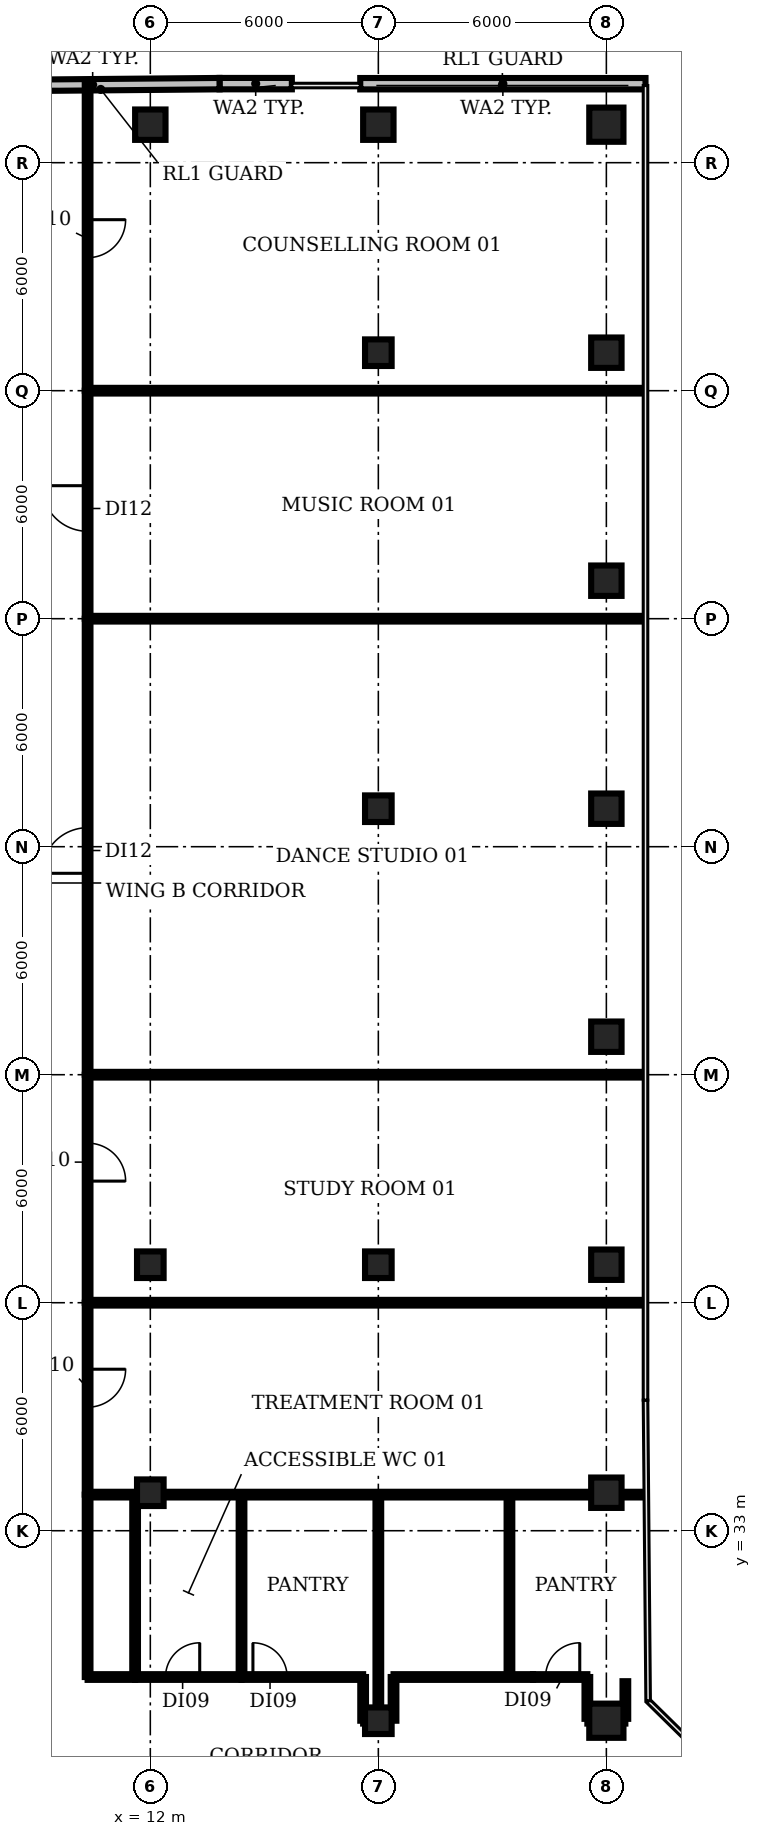
"""IFC4 building model, lengths in metres.
Left out: names, types, materials, properties, quantities, classifications, styles, units other than length and angle.
Written with IfcOpenShell. Run it as: python <this file> out.ifc"""

import sys

from ifc_helpers import new_model, si_unit, direction, frame, frame_2d, origin, origin_2d, place, context, subcontext, project, spatial, rectangle, circle, extrude, element, fill, save


model = new_model("IFC4")
c1 = context("Model", 3, precision=1e-05, world=origin(), true_north=direction((0.0, 1.0)))
c2 = subcontext(c1, "Body", "Model", "MODEL_VIEW")
j1 = project(units=[si_unit("LENGTHUNIT", "METRE"), si_unit("PLANEANGLEUNIT", "RADIAN")], contexts=[c1])
p1 = place(None, origin())
s1 = spatial("IfcSite", under=j1, at=p1, CompositionType="ELEMENT")
p2 = place(p1, origin())
s2 = spatial("IfcBuilding", under=s1, at=p2, CompositionType="ELEMENT")
p3 = place(p2, frame((0.0, 0.0, 226.4)))
s3 = spatial("IfcBuildingStorey", under=s2, at=p3, CompositionType="ELEMENT", Elevation=226.4)
for number, where, z_axis, x_axis in (
    (1, (12.0, 34.0, 0.0), (0.0, 0.0, 1.0), (1.0, 0.0, 0.0)),
    (2, (12.0, 40.0, 0.0), (0.0, 0.0, 1.0), (1.0, 0.0, 0.0)),
):
    element("IfcColumn", number, at=place(p3, frame(where, z_axis=z_axis, x_axis=x_axis)), inside=s3, PredefinedType="COLUMN", context=c2, shape_type="SweptSolid", body=[
        extrude(rectangle(XDim=0.7, YDim=0.7, at=origin_2d()), origin(), (0.0, 0.0, 1.0), 3.85),
    ])
p4 = place(p3, frame((12.0, 70.0, 0.0), z_axis=(0.0, 0.0, 1.0), x_axis=(1.0, 0.0, 0.0)))
e3 = element("IfcColumn", 3, at=p4, inside=s3, PredefinedType="COLUMN", context=c2, shape_type="SweptSolid", body=[
    extrude(rectangle(XDim=0.8, YDim=0.8, at=origin_2d()), origin(), (0.0, 0.0, 1.0), 3.85),
])
for number, where, z_axis, x_axis in (
    (4, (18.0, 28.0, 0.0), (0.0, 0.0, 1.0), (1.0, 0.0, 0.0)),
    (5, (18.0, 40.0, 0.0), (0.0, 0.0, 1.0), (1.0, 0.0, 0.0)),
    (6, (18.0, 52.0, 0.0), (0.0, 0.0, 1.0), (1.0, 0.0, 0.0)),
    (7, (18.0, 64.0, 0.0), (0.0, 0.0, 1.0), (1.0, 0.0, 0.0)),
):
    element("IfcColumn", number, at=place(p3, frame(where, z_axis=z_axis, x_axis=x_axis)), inside=s3, PredefinedType="COLUMN", context=c2, shape_type="SweptSolid", body=[
        extrude(rectangle(XDim=0.7, YDim=0.7, at=origin_2d()), origin(), (0.0, 0.0, 1.0), 3.85),
    ])
p5 = place(p3, frame((18.0, 70.0, 0.0), z_axis=(0.0, 0.0, 1.0), x_axis=(1.0, 0.0, 0.0)))
e8 = element("IfcColumn", 8, at=p5, inside=s3, PredefinedType="COLUMN", context=c2, shape_type="SweptSolid", body=[
    extrude(rectangle(XDim=0.8, YDim=0.8, at=origin_2d()), origin(), (0.0, 0.0, 1.0), 3.85),
])
p6 = place(p3, frame((24.0, 28.0, 0.0), z_axis=(0.0, 0.0, 1.0), x_axis=(1.0, 0.0, 0.0)))
e9 = element("IfcColumn", 9, at=p6, inside=s3, PredefinedType="COLUMN", context=c2, shape_type="SweptSolid", body=[
    extrude(circle(Radius=0.45, at=origin_2d()), origin(), (0.0, 0.0, 1.0), 3.85),
])
for number, where, z_axis, x_axis in (
    (10, (24.0, 34.0, 0.0), (0.0, 0.0, 1.0), (1.0, 0.0, 0.0)),
    (11, (24.0, 40.0, 0.0), (0.0, 0.0, 1.0), (1.0, 0.0, 0.0)),
    (12, (24.0, 46.0, 0.0), (0.0, 0.0, 1.0), (1.0, 0.0, 0.0)),
    (13, (24.0, 52.0, 0.0), (0.0, 0.0, 1.0), (1.0, 0.0, 0.0)),
    (14, (24.0, 58.0, 0.0), (0.0, 0.0, 1.0), (1.0, 0.0, 0.0)),
    (15, (24.0, 64.0, 0.0), (0.0, 0.0, 1.0), (1.0, 0.0, 0.0)),
):
    element("IfcColumn", number, at=place(p3, frame(where, z_axis=z_axis, x_axis=x_axis)), inside=s3, PredefinedType="COLUMN", context=c2, shape_type="SweptSolid", body=[
        extrude(rectangle(XDim=0.8, YDim=0.8, at=origin_2d()), origin(), (0.0, 0.0, 1.0), 3.85),
    ])
p7 = place(p3, frame((24.0, 70.0, 0.0), z_axis=(0.0, 0.0, 1.0), x_axis=(1.0, 0.0, 0.0)))
e16 = element("IfcColumn", 16, at=p7, inside=s3, PredefinedType="COLUMN", context=c2, shape_type="SweptSolid", body=[
    extrude(circle(Radius=0.45, at=origin_2d()), origin(), (0.0, 0.0, 1.0), 3.85),
])
p8 = place(p3, frame((25.03, 71.078, 0.0), z_axis=(0.0, 0.0, 1.0), x_axis=(-1.0, 0.0, 0.0)))
e17 = element("IfcWall", 17, at=p8, inside=s3, PredefinedType="SOLIDWALL", context=c2, shape_type="SweptSolid", body=[
    extrude(rectangle(XDim=7.506, YDim=0.3, at=frame_2d((3.753, 0.0))), origin(), (0.0, 0.0, 1.0), 3.85),
])
p9 = place(p3, frame((15.724, 71.08, 0.0), z_axis=(0.0, 0.0, 1.0), x_axis=(-1.0, 0.0, 0.0)))
e18 = element("IfcWall", 18, at=p9, inside=s3, PredefinedType="SOLIDWALL", context=c2, shape_type="SweptSolid", body=[
    extrude(rectangle(XDim=1.902, YDim=0.3, at=frame_2d((0.951, 0.0))), origin(), (0.0, 0.0, 1.0), 3.85),
])
p10 = place(p3, frame((13.821, 71.08, 0.0), z_axis=(0.0, 0.0, 1.0), x_axis=(-0.999961815264, -0.008738879401, 0.0)))
e19 = element("IfcWall", 19, at=p10, inside=s3, PredefinedType="SOLIDWALL", context=c2, shape_type="SweptSolid", body=[
    extrude(rectangle(XDim=6.677, YDim=0.3, at=frame_2d((3.338, 0.0))), origin(), (0.0, 0.0, 1.0), 3.85),
])
p11 = place(p3, frame((10.35, 29.15, 0.0), z_axis=(0.0, 0.0, 1.0), x_axis=(0.0, 1.0, 0.0)))
e20 = element("IfcWall", 20, at=p11, inside=s3, PredefinedType="PARTITIONING", context=c2, shape_type="SweptSolid", body=[
    extrude(rectangle(XDim=4.8, YDim=0.15, at=frame_2d((2.4, 0.0))), origin(), (0.0, 0.0, 1.0), 2.88),
])
p12 = place(p3, frame((10.35, 29.15, 0.0), z_axis=(0.0, 0.0, 1.0), x_axis=(1.0, 0.0, 0.0)))
e21 = element("IfcWall", 21, at=p12, inside=s3, PredefinedType="PARTITIONING", context=c2, shape_type="SweptSolid", body=[
    extrude(rectangle(XDim=1.25, YDim=0.15, at=frame_2d((0.625, 0.0))), origin(), (0.0, 0.0, 1.0), 2.88),
])
p13 = place(p3, frame((10.35, 33.95, 0.0), z_axis=(0.0, 0.0, 1.0), x_axis=(1.0, 0.0, 0.0)))
e22 = element("IfcWall", 22, at=p13, inside=s3, PredefinedType="PARTITIONING", context=c2, shape_type="SweptSolid", body=[
    extrude(rectangle(XDim=1.242, YDim=0.15, at=frame_2d((0.621, 0.0))), origin(), (0.0, 0.0, 1.0), 2.88),
])
p14 = place(p3, frame((10.35, 39.0, 0.0), z_axis=(0.0, 0.0, 1.0), x_axis=(0.0, -1.0, 0.0)))
e23 = element("IfcWall", 23, at=p14, inside=s3, PredefinedType="PARTITIONING", context=c2, shape_type="SweptSolid", body=[
    extrude(rectangle(XDim=5.05, YDim=0.15, at=frame_2d((2.525, 0.0))), origin(), (0.0, 0.0, 1.0), 2.88),
])
p15 = place(p14, frame((1.75, 0.0, 0.0)))
e24 = element("IfcOpeningElement", 24, at=p15, cuts=e23, PredefinedType="OPENING", context=c2, shape_type="SweptSolid", body=[
    extrude(rectangle(XDim=1.0, YDim=2.1, at=frame_2d((0.5, 1.05))), frame((0.0, 0.085, 0.0), z_axis=(0.0, -1.0, 0.0), x_axis=(1.0, 0.0, 0.0)), (0.0, 0.0, 1.0), 0.17),
])
p16 = place(p3, frame((10.35, 39.0, 0.0), z_axis=(0.0, 0.0, 1.0), x_axis=(1.0, 0.0, 0.0)))
e25 = element("IfcWall", 25, at=p16, inside=s3, PredefinedType="PARTITIONING", context=c2, shape_type="SweptSolid", body=[
    extrude(rectangle(XDim=14.63, YDim=0.15, at=frame_2d((7.315, 0.0))), origin(), (0.0, 0.0, 1.0), 2.88),
])
p17 = place(p3, frame((10.35, 45.0, 0.0), z_axis=(0.0, 0.0, 1.0), x_axis=(0.0, -1.0, 0.0)))
e26 = element("IfcWall", 26, at=p17, inside=s3, PredefinedType="PARTITIONING", context=c2, shape_type="SweptSolid", body=[
    extrude(rectangle(XDim=6.0, YDim=0.15, at=frame_2d((3.0, 0.0))), origin(), (0.0, 0.0, 1.0), 2.88),
])
p18 = place(p17, frame((1.8, 0.0, 0.0)))
e27 = element("IfcOpeningElement", 27, at=p18, cuts=e26, PredefinedType="OPENING", context=c2, shape_type="SweptSolid", body=[
    extrude(rectangle(XDim=1.0, YDim=2.1, at=frame_2d((0.5, 1.05))), frame((0.0, 0.085, 0.0), z_axis=(0.0, -1.0, 0.0), x_axis=(1.0, 0.0, 0.0)), (0.0, 0.0, 1.0), 0.17),
])
p19 = place(p3, frame((10.35, 45.0, 0.0), z_axis=(0.0, 0.0, 1.0), x_axis=(0.0, 1.0, 0.0)))
e28 = element("IfcWall", 28, at=p19, inside=s3, PredefinedType="PARTITIONING", context=c2, shape_type="SweptSolid", body=[
    extrude(rectangle(XDim=12.0, YDim=0.15, at=frame_2d((6.0, 0.0))), origin(), (0.0, 0.0, 1.0), 2.88),
])
p20 = place(p19, frame((5.3, 0.0, 0.0)))
e29 = element("IfcOpeningElement", 29, at=p20, cuts=e28, PredefinedType="OPENING", context=c2, shape_type="SweptSolid", body=[
    extrude(rectangle(XDim=1.2, YDim=2.1, at=frame_2d((0.6, 1.05))), frame((0.0, 0.085, 0.0), z_axis=(0.0, -1.0, 0.0), x_axis=(1.0, 0.0, 0.0)), (0.0, 0.0, 1.0), 0.17),
])
p21 = place(p3, frame((10.35, 45.0, 0.0), z_axis=(0.0, 0.0, 1.0), x_axis=(1.0, 0.0, 0.0)))
e30 = element("IfcWall", 30, at=p21, inside=s3, PredefinedType="PARTITIONING", context=c2, shape_type="SweptSolid", body=[
    extrude(rectangle(XDim=14.63, YDim=0.15, at=frame_2d((7.315, 0.0))), origin(), (0.0, 0.0, 1.0), 2.88),
])
p22 = place(p3, frame((10.35, 57.0, 0.0), z_axis=(0.0, 0.0, 1.0), x_axis=(0.0, 1.0, 0.0)))
e31 = element("IfcWall", 31, at=p22, inside=s3, PredefinedType="PARTITIONING", context=c2, shape_type="SweptSolid", body=[
    extrude(rectangle(XDim=6.0, YDim=0.15, at=frame_2d((3.0, 0.0))), origin(), (0.0, 0.0, 1.0), 2.88),
])
p23 = place(p22, frame((2.3, 0.0, 0.0)))
e32 = element("IfcOpeningElement", 32, at=p23, cuts=e31, PredefinedType="OPENING", context=c2, shape_type="SweptSolid", body=[
    extrude(rectangle(XDim=1.2, YDim=2.1, at=frame_2d((0.6, 1.05))), frame((0.0, 0.085, 0.0), z_axis=(0.0, -1.0, 0.0), x_axis=(1.0, 0.0, 0.0)), (0.0, 0.0, 1.0), 0.17),
])
for number, where, z_axis, x_axis in (
    (33, (10.35, 57.0, 0.0), (0.0, 0.0, 1.0), (1.0, 0.0, 0.0)),
    (34, (10.35, 63.0, 0.0), (0.0, 0.0, 1.0), (1.0, 0.0, 0.0)),
):
    element("IfcWall", number, at=place(p3, frame(where, z_axis=z_axis, x_axis=x_axis)), inside=s3, PredefinedType="PARTITIONING", context=c2, shape_type="SweptSolid", body=[
        extrude(rectangle(XDim=14.63, YDim=0.15, at=frame_2d((7.315, 0.0))), origin(), (0.0, 0.0, 1.0), 2.88),
    ])
p24 = place(p3, frame((10.35, 71.06, 0.0), z_axis=(0.0, 0.0, 1.0), x_axis=(0.0, -1.0, 0.0)))
e35 = element("IfcWall", 35, at=p24, inside=s3, PredefinedType="PARTITIONING", context=c2, shape_type="SweptSolid", body=[
    extrude(rectangle(XDim=8.06, YDim=0.15, at=frame_2d((4.03, 0.0))), origin(), (0.0, 0.0, 1.0), 2.88),
])
p25 = place(p24, frame((3.56, 0.0, 0.0)))
e36 = element("IfcOpeningElement", 36, at=p25, cuts=e35, PredefinedType="OPENING", context=c2, shape_type="SweptSolid", body=[
    extrude(rectangle(XDim=1.0, YDim=2.1, at=frame_2d((0.5, 1.05))), frame((0.0, 0.085, 0.0), z_axis=(0.0, -1.0, 0.0), x_axis=(1.0, 0.0, 0.0)), (0.0, 0.0, 1.0), 0.17),
])
p26 = place(p3, frame((11.6, 29.15, 0.0), z_axis=(0.0, 0.0, 1.0), x_axis=(0.0, 1.0, 0.0)))
e37 = element("IfcWall", 37, at=p26, inside=s3, PredefinedType="PARTITIONING", context=c2, shape_type="SweptSolid", body=[
    extrude(rectangle(XDim=4.72, YDim=0.15, at=frame_2d((2.36, 0.0))), origin(), (0.0, 0.0, 1.0), 2.88),
])
p27 = place(p3, frame((11.6, 29.15, 0.0), z_axis=(0.0, 0.0, 1.0), x_axis=(1.0, 0.0, 0.0)))
e38 = element("IfcWall", 38, at=p27, inside=s3, PredefinedType="PARTITIONING", context=c2, shape_type="SweptSolid", body=[
    extrude(rectangle(XDim=2.8, YDim=0.15, at=frame_2d((1.4, 0.0))), origin(), (0.0, 0.0, 1.0), 2.88),
])
p28 = place(p27, frame((0.8, 0.0, 0.0)))
e39 = element("IfcOpeningElement", 39, at=p28, cuts=e38, PredefinedType="OPENING", context=c2, shape_type="SweptSolid", body=[
    extrude(rectangle(XDim=0.9, YDim=2.1, at=frame_2d((0.45, 1.05))), frame((0.0, 0.085, 0.0), z_axis=(0.0, -1.0, 0.0), x_axis=(1.0, 0.0, 0.0)), (0.0, 0.0, 1.0), 0.17),
])
p29 = place(p3, frame((11.696, 33.95, 0.0), z_axis=(0.0, 0.0, 1.0), x_axis=(1.0, 0.0, 0.0)))
e40 = element("IfcWall", 40, at=p29, inside=s3, PredefinedType="PARTITIONING", context=c2, shape_type="SweptSolid", body=[
    extrude(rectangle(XDim=0.621, YDim=0.15, at=frame_2d((0.311, 0.0))), origin(), (0.0, 0.0, 1.0), 2.88),
])
p30 = place(p3, frame((12.42, 33.95, 0.0), z_axis=(0.0, 0.0, 1.0), x_axis=(1.0, 0.0, 0.0)))
e41 = element("IfcWall", 41, at=p30, inside=s3, PredefinedType="PARTITIONING", context=c2, shape_type="SweptSolid", body=[
    extrude(rectangle(XDim=12.58, YDim=0.15, at=frame_2d((6.29, 0.0))), origin(), (0.0, 0.0, 1.0), 2.88),
])
p31 = place(p3, frame((14.4, 29.15, 0.0), z_axis=(0.0, 0.0, 1.0), x_axis=(0.0, 1.0, 0.0)))
e42 = element("IfcWall", 42, at=p31, inside=s3, PredefinedType="PARTITIONING", context=c2, shape_type="SweptSolid", body=[
    extrude(rectangle(XDim=4.8, YDim=0.15, at=frame_2d((2.4, 0.0))), origin(), (0.0, 0.0, 1.0), 2.88),
])
p32 = place(p3, frame((14.4, 29.15, 0.0), z_axis=(0.0, 0.0, 1.0), x_axis=(1.0, 0.0, 0.0)))
e43 = element("IfcWall", 43, at=p32, inside=s3, PredefinedType="PARTITIONING", context=c2, shape_type="SweptSolid", body=[
    extrude(rectangle(XDim=3.2, YDim=0.15, at=frame_2d((1.6, 0.0))), origin(), (0.0, 0.0, 1.0), 2.88),
])
p33 = place(p32, frame((0.3, 0.0, 0.0)))
e44 = element("IfcOpeningElement", 44, at=p33, cuts=e43, PredefinedType="OPENING", context=c2, shape_type="SweptSolid", body=[
    extrude(rectangle(XDim=0.9, YDim=2.1, at=frame_2d((0.45, 1.05))), frame((0.0, 0.085, 0.0), z_axis=(0.0, -1.0, 0.0), x_axis=(1.0, 0.0, 0.0)), (0.0, 0.0, 1.0), 0.17),
])
p34 = place(p3, frame((17.6, 28.0, 0.0), z_axis=(0.0, 0.0, 1.0), x_axis=(0.0, 1.0, 0.0)))
e45 = element("IfcWall", 45, at=p34, inside=s3, PredefinedType="PARTITIONING", context=c2, shape_type="SweptSolid", body=[
    extrude(rectangle(XDim=1.15, YDim=0.15, at=frame_2d((0.575, 0.0))), origin(), (0.0, 0.0, 1.0), 2.88),
])
p35 = place(p3, frame((17.6, 28.0, 0.0), z_axis=(0.0, 0.0, 1.0), x_axis=(1.0, 0.0, 0.0)))
e46 = element("IfcWall", 46, at=p35, inside=s3, PredefinedType="PARTITIONING", context=c2, shape_type="SweptSolid", body=[
    extrude(rectangle(XDim=0.4, YDim=0.15, at=frame_2d((0.2, 0.0))), origin(), (0.0, 0.0, 1.0), 2.88),
])
p36 = place(p3, frame((18.0, 28.0, 0.0), z_axis=(0.0, 0.0, 1.0), x_axis=(0.0, 1.0, 0.0)))
e47 = element("IfcWall", 47, at=p36, inside=s3, PredefinedType="PARTITIONING", context=c2, shape_type="SweptSolid", body=[
    extrude(rectangle(XDim=5.95, YDim=0.15, at=frame_2d((2.975, 0.0))), origin(), (0.0, 0.0, 1.0), 2.88),
])
p37 = place(p3, frame((18.4, 28.0, 0.0), z_axis=(0.0, 0.0, 1.0), x_axis=(0.0, 1.0, 0.0)))
e48 = element("IfcWall", 48, at=p37, inside=s3, PredefinedType="PARTITIONING", context=c2, shape_type="SweptSolid", body=[
    extrude(rectangle(XDim=1.15, YDim=0.15, at=frame_2d((0.575, 0.0))), origin(), (0.0, 0.0, 1.0), 2.88),
])
p38 = place(p3, frame((18.4, 29.15, 0.0), z_axis=(0.0, 0.0, 1.0), x_axis=(1.0, 0.0, 0.0)))
e49 = element("IfcWall", 49, at=p38, inside=s3, PredefinedType="PARTITIONING", context=c2, shape_type="SweptSolid", body=[
    extrude(rectangle(XDim=3.67, YDim=0.15, at=frame_2d((1.835, 0.0))), origin(), (0.0, 0.0, 1.0), 2.88),
])
p39 = place(p3, frame((21.45, 29.15, 0.0), z_axis=(0.0, 0.0, 1.0), x_axis=(0.0, 1.0, 0.0)))
e50 = element("IfcWall", 50, at=p39, inside=s3, PredefinedType="PARTITIONING", context=c2, shape_type="SweptSolid", body=[
    extrude(rectangle(XDim=4.8, YDim=0.15, at=frame_2d((2.4, 0.0))), origin(), (0.0, 0.0, 1.0), 2.88),
])
p40 = place(p3, frame((22.07, 29.15, 0.0), z_axis=(0.0, 0.0, 1.0), x_axis=(1.0, 0.0, 0.0)))
e51 = element("IfcWall", 51, at=p40, inside=s3, PredefinedType="PARTITIONING", context=c2, shape_type="SweptSolid", body=[
    extrude(rectangle(XDim=1.43, YDim=0.15, at=frame_2d((0.715, 0.0))), origin(), (0.0, 0.0, 1.0), 2.88),
])
p41 = place(p40, frame((0.33, 0.0, 0.0)))
e52 = element("IfcOpeningElement", 52, at=p41, cuts=e51, PredefinedType="OPENING", context=c2, shape_type="SweptSolid", body=[
    extrude(rectangle(XDim=0.9, YDim=2.1, at=frame_2d((0.45, 1.05))), frame((0.0, 0.085, 0.0), z_axis=(0.0, -1.0, 0.0), x_axis=(1.0, 0.0, 0.0)), (0.0, 0.0, 1.0), 0.17),
])
p42 = place(p3, frame((23.5, 28.0, 0.0), z_axis=(0.0, 0.0, 1.0), x_axis=(1.0, 0.0, 0.0)))
e53 = element("IfcWall", 53, at=p42, inside=s3, PredefinedType="PARTITIONING", context=c2, shape_type="SweptSolid", body=[
    extrude(rectangle(XDim=1.0, YDim=0.15, at=frame_2d((0.5, 0.0))), origin(), (0.0, 0.0, 1.0), 2.88),
])
p43 = place(p3, frame((23.5, 28.05, 0.0), z_axis=(0.0, 0.0, 1.0), x_axis=(0.0, 1.0, 0.0)))
e54 = element("IfcWall", 54, at=p43, inside=s3, PredefinedType="PARTITIONING", context=c2, shape_type="SweptSolid", body=[
    extrude(rectangle(XDim=1.1, YDim=0.15, at=frame_2d((0.55, 0.0))), origin(), (0.0, 0.0, 1.0), 2.88),
])
p44 = place(p3, frame((24.5, 28.05, 0.0), z_axis=(0.0, 0.0, 1.0), x_axis=(0.0, 1.0, 0.0)))
e55 = element("IfcWall", 55, at=p44, inside=s3, PredefinedType="PARTITIONING", context=c2, shape_type="SweptSolid", body=[
    extrude(rectangle(XDim=0.99, YDim=0.15, at=frame_2d((0.495, 0.0))), origin(), (0.0, 0.0, 1.0), 2.88),
])
p45 = place(p15, origin())
e56 = element("IfcDoor", 56, at=p45, inside=s3, OperationType="SINGLE_SWING_LEFT", PredefinedType="DOOR", context=c2, shape_type="SweptSolid", body=[
    extrude(rectangle(XDim=1.0, YDim=2.1, at=frame_2d((0.5, 1.05))), frame((0.0, 0.025, 0.0), z_axis=(0.0, -1.0, 0.0), x_axis=(1.0, 0.0, 0.0)), (0.0, 0.0, 1.0), 0.05),
])
fill(e24, e56)
p46 = place(p18, origin())
e57 = element("IfcDoor", 57, at=p46, inside=s3, OperationType="SINGLE_SWING_RIGHT", PredefinedType="DOOR", context=c2, shape_type="SweptSolid", body=[
    extrude(rectangle(XDim=1.0, YDim=2.1, at=frame_2d((0.5, 1.05))), frame((0.0, 0.025, 0.0), z_axis=(0.0, -1.0, 0.0), x_axis=(1.0, 0.0, 0.0)), (0.0, 0.0, 1.0), 0.05),
])
fill(e27, e57)
p47 = place(p20, origin())
e58 = element("IfcDoor", 58, at=p47, inside=s3, OperationType="SINGLE_SWING_LEFT", PredefinedType="DOOR", context=c2, shape_type="SweptSolid", body=[
    extrude(rectangle(XDim=1.2, YDim=2.1, at=frame_2d((0.6, 1.05))), frame((0.0, 0.025, 0.0), z_axis=(0.0, -1.0, 0.0), x_axis=(1.0, 0.0, 0.0)), (0.0, 0.0, 1.0), 0.05),
])
fill(e29, e58)
p48 = place(p23, origin())
e59 = element("IfcDoor", 59, at=p48, inside=s3, OperationType="SINGLE_SWING_RIGHT", PredefinedType="DOOR", context=c2, shape_type="SweptSolid", body=[
    extrude(rectangle(XDim=1.2, YDim=2.1, at=frame_2d((0.6, 1.05))), frame((0.0, 0.025, 0.0), z_axis=(0.0, -1.0, 0.0), x_axis=(1.0, 0.0, 0.0)), (0.0, 0.0, 1.0), 0.05),
])
fill(e32, e59)
p49 = place(p25, origin())
e60 = element("IfcDoor", 60, at=p49, inside=s3, OperationType="SINGLE_SWING_LEFT", PredefinedType="DOOR", context=c2, shape_type="SweptSolid", body=[
    extrude(rectangle(XDim=1.0, YDim=2.1, at=frame_2d((0.5, 1.05))), frame((0.0, 0.025, 0.0), z_axis=(0.0, -1.0, 0.0), x_axis=(1.0, 0.0, 0.0)), (0.0, 0.0, 1.0), 0.05),
])
fill(e36, e60)
p50 = place(p28, origin())
e61 = element("IfcDoor", 61, at=p50, inside=s3, OperationType="SINGLE_SWING_RIGHT", PredefinedType="DOOR", context=c2, shape_type="SweptSolid", body=[
    extrude(rectangle(XDim=0.9, YDim=2.1, at=frame_2d((0.45, 1.05))), frame((0.0, 0.025, 0.0), z_axis=(0.0, -1.0, 0.0), x_axis=(1.0, 0.0, 0.0)), (0.0, 0.0, 1.0), 0.05),
])
fill(e39, e61)
p51 = place(p33, origin())
e62 = element("IfcDoor", 62, at=p51, inside=s3, OperationType="SINGLE_SWING_LEFT", PredefinedType="DOOR", context=c2, shape_type="SweptSolid", body=[
    extrude(rectangle(XDim=0.9, YDim=2.1, at=frame_2d((0.45, 1.05))), frame((0.0, 0.025, 0.0), z_axis=(0.0, -1.0, 0.0), x_axis=(1.0, 0.0, 0.0)), (0.0, 0.0, 1.0), 0.05),
])
fill(e44, e62)
p52 = place(p41, origin())
e63 = element("IfcDoor", 63, at=p52, inside=s3, OperationType="SINGLE_SWING_RIGHT", PredefinedType="DOOR", context=c2, shape_type="SweptSolid", body=[
    extrude(rectangle(XDim=0.9, YDim=2.1, at=frame_2d((0.45, 1.05))), frame((0.0, 0.025, 0.0), z_axis=(0.0, -1.0, 0.0), x_axis=(1.0, 0.0, 0.0)), (0.0, 0.0, 1.0), 0.05),
])
fill(e52, e63)
save(model, sys.argv[1])
